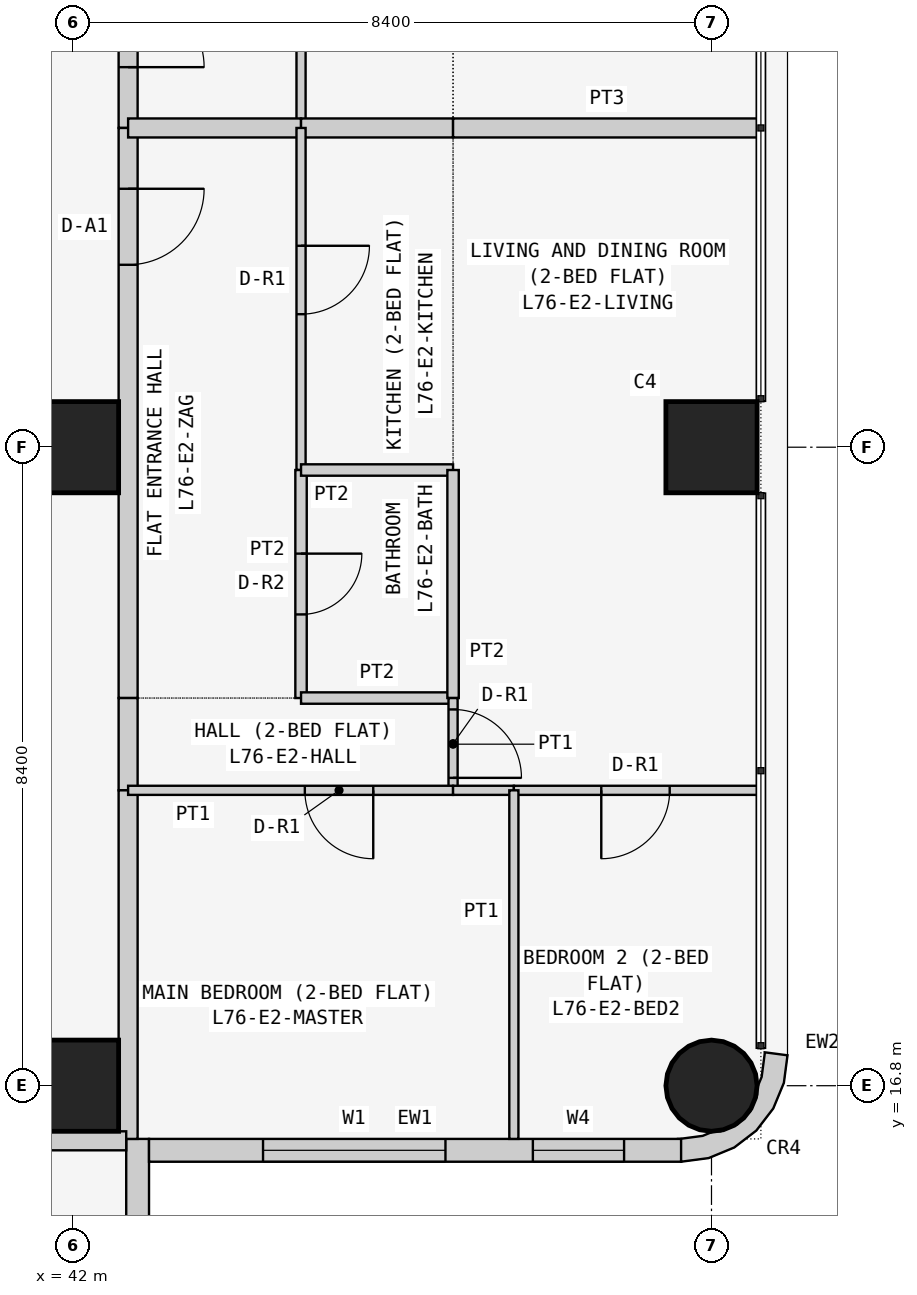
"""IFC4 building model, lengths in metres.
Left out: names, types, materials, properties, quantities, classifications, styles, units other than length and angle.
Written with IfcOpenShell. Run it as: python <this file> out.ifc"""

import sys

from ifc_helpers import new_model, si_unit, direction, frame, frame_2d, origin, origin_2d, place, context, subcontext, project, spatial, polyline, rectangle, circle, outline, extrude, element, fill, save


model = new_model("IFC4")
c1 = context("Model", 3, precision=1e-05, world=origin(), true_north=direction((0.0, 1.0)))
c2 = subcontext(c1, "Body", "Model", "MODEL_VIEW")
j1 = project(units=[si_unit("LENGTHUNIT", "METRE"), si_unit("PLANEANGLEUNIT", "RADIAN")], contexts=[c1])
p1 = place(None, origin())
s1 = spatial("IfcSite", under=j1, at=p1, CompositionType="ELEMENT")
p2 = place(p1, origin())
s2 = spatial("IfcBuilding", under=s1, at=p2, CompositionType="ELEMENT")
p3 = place(p2, frame((0.0, 0.0, 290.1)))
s3 = spatial("IfcBuildingStorey", under=s2, at=p3, CompositionType="ELEMENT", Elevation=290.1)
for number, where, z_axis, x_axis in (
    (1, (42.0, 16.8, 0.0), (0.0, 0.0, 1.0), (1.0, 0.0, 0.0)),
    (2, (42.0, 25.2, 0.0), (0.0, 0.0, 1.0), (1.0, 0.0, 0.0)),
):
    element("IfcColumn", number, at=place(p3, frame(where, z_axis=z_axis, x_axis=x_axis)), inside=s3, PredefinedType="COLUMN", context=c2, shape_type="SweptSolid", body=[
        extrude(rectangle(XDim=1.2, YDim=1.2, at=origin_2d()), origin(), (0.0, 0.0, 1.0), 3.6),
    ])
p4 = place(p3, frame((50.4, 16.8, 0.0), z_axis=(0.0, 0.0, 1.0), x_axis=(1.0, 0.0, 0.0)))
e3 = element("IfcColumn", 3, at=p4, inside=s3, PredefinedType="COLUMN", context=c2, shape_type="SweptSolid", body=[
    extrude(circle(Radius=0.6, at=origin_2d()), origin(), (0.0, 0.0, 1.0), 3.6),
])
p5 = place(p3, frame((50.4, 25.2, 0.0), z_axis=(0.0, 0.0, 1.0), x_axis=(1.0, 0.0, 0.0)))
e4 = element("IfcColumn", 4, at=p5, inside=s3, PredefinedType="COLUMN", context=c2, shape_type="SweptSolid", body=[
    extrude(rectangle(XDim=1.2, YDim=1.2, at=origin_2d()), origin(), (0.0, 0.0, 1.0), 3.6),
])
p6 = place(p3, frame((42.85, 8.8, 0.0), z_axis=(0.0, 0.0, 1.0), x_axis=(0.0, 1.0, 0.0)))
e5 = element("IfcWall", 5, at=p6, inside=s3, PredefinedType="SOLIDWALL", context=c2, shape_type="SweptSolid", body=[
    extrude(rectangle(XDim=7.3, YDim=0.3, at=frame_2d((3.65, 0.0))), origin(), (0.0, 0.0, 1.0), 3.45),
])
p7 = place(p6, frame((3.1, 0.0, 0.9)))
e6 = element("IfcOpeningElement", 6, at=p7, cuts=e5, PredefinedType="OPENING", context=c2, shape_type="SweptSolid", body=[
    extrude(rectangle(XDim=2.4, YDim=1.5, at=frame_2d((1.2, 0.75))), frame((0.0, 0.16, 0.0), z_axis=(0.0, -1.0, 0.0), x_axis=(1.0, 0.0, 0.0)), (0.0, 0.0, 1.0), 0.32),
])
p8 = place(p6, frame((0.75, 0.0, 0.9)))
e7 = element("IfcOpeningElement", 7, at=p8, cuts=e5, PredefinedType="OPENING", context=c2, shape_type="SweptSolid", body=[
    extrude(rectangle(XDim=1.2, YDim=1.5, at=frame_2d((0.6, 0.75))), frame((0.0, 0.16, 0.0), z_axis=(0.0, -1.0, 0.0), x_axis=(1.0, 0.0, 0.0)), (0.0, 0.0, 1.0), 0.32),
])
p9 = place(p3, frame((43.0, 15.95, 0.0), z_axis=(0.0, 0.0, 1.0), x_axis=(1.0, 0.0, 0.0)))
e8 = element("IfcWall", 8, at=p9, inside=s3, PredefinedType="SOLIDWALL", context=c2, shape_type="SweptSolid", body=[
    extrude(rectangle(XDim=7.0, YDim=0.3, at=frame_2d((3.5, 0.0))), origin(), (0.0, 0.0, 1.0), 3.45),
])
p10 = place(p9, frame((1.5, 0.0, 0.9)))
e9 = element("IfcOpeningElement", 9, at=p10, cuts=e8, PredefinedType="OPENING", context=c2, shape_type="SweptSolid", body=[
    extrude(rectangle(XDim=2.4, YDim=1.5, at=frame_2d((1.2, 0.75))), frame((0.0, 0.16, 0.0), z_axis=(0.0, -1.0, 0.0), x_axis=(1.0, 0.0, 0.0)), (0.0, 0.0, 1.0), 0.32),
])
p11 = place(p9, frame((5.05, 0.0, 0.9)))
e10 = element("IfcOpeningElement", 10, at=p11, cuts=e8, PredefinedType="OPENING", context=c2, shape_type="SweptSolid", body=[
    extrude(rectangle(XDim=1.2, YDim=1.5, at=frame_2d((0.6, 0.75))), frame((0.0, 0.16, 0.0), z_axis=(0.0, -1.0, 0.0), x_axis=(1.0, 0.0, 0.0)), (0.0, 0.0, 1.0), 0.32),
])
p12 = place(p3, frame((50.038, 16.224, 0.0), z_axis=(0.0, 0.0, 1.0), x_axis=(0.707106781187, -0.707106781187, 0.0)))
e11 = element("IfcWall", 11, at=p12, inside=s3, PredefinedType="SOLIDWALL", context=c2, shape_type="SweptSolid", body=[
    extrude(outline(polyline([(0.047, 1.455), (0.233, 1.212), (0.292, 1.069), (0.358, 1.003), (0.449, 0.782), (0.449, 0.543), (0.358, 0.322), (0.292, 0.257), (0.233, 0.114), (0.047, -0.129), (0.033, -0.143), (0.273, -0.327), (0.495, -0.037), (0.635, 0.301), (0.683, 0.663), (0.635, 1.025), (0.495, 1.363), (0.273, 1.653), (0.033, 1.469), (0.047, 1.455)])), origin(), (0.0, 0.0, 1.0), 3.45),
])
p13 = place(p3, frame((42.725, 36.9, 0.0), z_axis=(0.0, 0.0, 1.0), x_axis=(0.0, -1.0, 0.0)))
e12 = element("IfcWall", 12, at=p13, inside=s3, PredefinedType="PARTITIONING", context=c2, shape_type="SweptSolid", body=[
    extrude(rectangle(XDim=7.5, YDim=0.25, at=frame_2d((3.75, 0.0))), origin(), (0.0, 0.0, 1.0), 3.45),
])
p14 = place(p13, frame((5.7, 0.0, 0.0)))
e13 = element("IfcOpeningElement", 13, at=p14, cuts=e12, PredefinedType="OPENING", context=c2, shape_type="SweptSolid", body=[
    extrude(rectangle(XDim=1.0, YDim=2.1, at=frame_2d((0.5, 1.05))), frame((0.0, 0.135, 0.0), z_axis=(0.0, -1.0, 0.0), x_axis=(1.0, 0.0, 0.0)), (0.0, 0.0, 1.0), 0.27),
])
p15 = place(p3, frame((42.725, 29.4, 0.0), z_axis=(0.0, 0.0, 1.0), x_axis=(0.0, -1.0, 0.0)))
e14 = element("IfcWall", 14, at=p15, inside=s3, PredefinedType="PARTITIONING", context=c2, shape_type="SweptSolid", body=[
    extrude(rectangle(XDim=7.5, YDim=0.25, at=frame_2d((3.75, 0.0))), origin(), (0.0, 0.0, 1.0), 3.45),
])
p16 = place(p15, frame((0.8, 0.0, 0.0)))
e15 = element("IfcOpeningElement", 15, at=p16, cuts=e14, PredefinedType="OPENING", context=c2, shape_type="SweptSolid", body=[
    extrude(rectangle(XDim=1.0, YDim=2.1, at=frame_2d((0.5, 1.05))), frame((0.0, 0.135, 0.0), z_axis=(0.0, -1.0, 0.0), x_axis=(1.0, 0.0, 0.0)), (0.0, 0.0, 1.0), 0.27),
])
p17 = place(p3, frame((42.725, 21.9, 0.0), z_axis=(0.0, 0.0, 1.0), x_axis=(0.0, -1.0, 0.0)))
e16 = element("IfcWall", 16, at=p17, inside=s3, PredefinedType="PARTITIONING", context=c2, shape_type="SweptSolid", body=[
    extrude(rectangle(XDim=1.214, YDim=0.25, at=frame_2d((0.607, 0.0))), origin(), (0.0, 0.0, 1.0), 3.45),
])
p18 = place(p3, frame((42.725, 20.686, 0.0), z_axis=(0.0, 0.0, 1.0), x_axis=(0.0, -1.0, 0.0)))
e17 = element("IfcWall", 17, at=p18, inside=s3, PredefinedType="PARTITIONING", context=c2, shape_type="SweptSolid", body=[
    extrude(rectangle(XDim=4.586, YDim=0.25, at=frame_2d((2.293, 0.0))), origin(), (0.0, 0.0, 1.0), 3.45),
])
p19 = place(p3, frame((42.7, 16.075, 0.0), z_axis=(0.0, 0.0, 1.0), x_axis=(-1.0, 0.0, 0.0)))
e18 = element("IfcWall", 18, at=p19, inside=s3, PredefinedType="PARTITIONING", context=c2, shape_type="SweptSolid", body=[
    extrude(rectangle(XDim=6.871, YDim=0.25, at=frame_2d((3.436, 0.0))), origin(), (0.0, 0.0, 1.0), 3.45),
])
p20 = place(p3, frame((45.0, 29.4, 0.0), z_axis=(0.0, 0.0, 1.0), x_axis=(0.0, 1.0, 0.0)))
e19 = element("IfcWall", 19, at=p20, inside=s3, PredefinedType="PARTITIONING", context=c2, shape_type="SweptSolid", body=[
    extrude(rectangle(XDim=4.5, YDim=0.12, at=frame_2d((2.25, 0.0))), origin(), (0.0, 0.0, 1.0), 3.45),
])
p21 = place(p20, frame((1.55, 0.0, 0.0)))
e20 = element("IfcOpeningElement", 20, at=p21, cuts=e19, PredefinedType="OPENING", context=c2, shape_type="SweptSolid", body=[
    extrude(rectangle(XDim=0.9, YDim=2.1, at=frame_2d((0.45, 1.05))), frame((0.0, 0.07, 0.0), z_axis=(0.0, -1.0, 0.0), x_axis=(1.0, 0.0, 0.0)), (0.0, 0.0, 1.0), 0.14),
])
p22 = place(p3, frame((42.725, 29.4, 0.0), z_axis=(0.0, 0.0, 1.0), x_axis=(1.0, 0.0, 0.0)))
e21 = element("IfcWall", 21, at=p22, inside=s3, PredefinedType="PARTITIONING", context=c2, shape_type="SweptSolid", body=[
    extrude(rectangle(XDim=2.275, YDim=0.25, at=frame_2d((1.137, 0.0))), origin(), (0.0, 0.0, 1.0), 3.45),
])
p23 = place(p3, frame((45.0, 29.4, 0.0), z_axis=(0.0, 0.0, 1.0), x_axis=(1.0, 0.0, 0.0)))
e22 = element("IfcWall", 22, at=p23, inside=s3, PredefinedType="PARTITIONING", context=c2, shape_type="SweptSolid", body=[
    extrude(rectangle(XDim=2.0, YDim=0.25, at=frame_2d((1.0, 0.0))), origin(), (0.0, 0.0, 1.0), 3.45),
])
p24 = place(p3, frame((47.0, 29.4, 0.0), z_axis=(0.0, 0.0, 1.0), x_axis=(1.0, 0.0, 0.0)))
e23 = element("IfcWall", 23, at=p24, inside=s3, PredefinedType="PARTITIONING", context=c2, shape_type="SweptSolid", body=[
    extrude(rectangle(XDim=4.05, YDim=0.25, at=frame_2d((2.025, 0.0))), origin(), (0.0, 0.0, 1.0), 3.45),
])
p25 = place(p3, frame((45.0, 29.4, 0.0), z_axis=(0.0, 0.0, 1.0), x_axis=(0.0, -1.0, 0.0)))
e24 = element("IfcWall", 24, at=p25, inside=s3, PredefinedType="PARTITIONING", context=c2, shape_type="SweptSolid", body=[
    extrude(rectangle(XDim=4.5, YDim=0.12, at=frame_2d((2.25, 0.0))), origin(), (0.0, 0.0, 1.0), 3.45),
])
p26 = place(p25, frame((1.55, 0.0, 0.0)))
e25 = element("IfcOpeningElement", 25, at=p26, cuts=e24, PredefinedType="OPENING", context=c2, shape_type="SweptSolid", body=[
    extrude(rectangle(XDim=0.9, YDim=2.1, at=frame_2d((0.45, 1.05))), frame((0.0, 0.07, 0.0), z_axis=(0.0, -1.0, 0.0), x_axis=(1.0, 0.0, 0.0)), (0.0, 0.0, 1.0), 0.14),
])
p27 = place(p3, frame((45.0, 24.9, 0.0), z_axis=(0.0, 0.0, 1.0), x_axis=(0.0, -1.0, 0.0)))
e26 = element("IfcWall", 26, at=p27, inside=s3, PredefinedType="PARTITIONING", context=c2, shape_type="SweptSolid", body=[
    extrude(rectangle(XDim=3.0, YDim=0.15, at=frame_2d((1.5, 0.0))), origin(), (0.0, 0.0, 1.0), 3.45),
])
p28 = place(p27, frame((1.1, 0.0, 0.0)))
e27 = element("IfcOpeningElement", 27, at=p28, cuts=e26, PredefinedType="OPENING", context=c2, shape_type="SweptSolid", body=[
    extrude(rectangle(XDim=0.8, YDim=2.1, at=frame_2d((0.4, 1.05))), frame((0.0, 0.085, 0.0), z_axis=(0.0, -1.0, 0.0), x_axis=(1.0, 0.0, 0.0)), (0.0, 0.0, 1.0), 0.17),
])
for number, where, z_axis, x_axis in (
    (28, (47.0, 24.9, 0.0), (0.0, 0.0, 1.0), (-1.0, 0.0, 0.0)),
    (29, (47.0, 21.9, 0.0), (0.0, 0.0, 1.0), (-1.0, 0.0, 0.0)),
):
    element("IfcWall", number, at=place(p3, frame(where, z_axis=z_axis, x_axis=x_axis)), inside=s3, PredefinedType="PARTITIONING", context=c2, shape_type="SweptSolid", body=[
        extrude(rectangle(XDim=2.0, YDim=0.15, at=frame_2d((1.0, 0.0))), origin(), (0.0, 0.0, 1.0), 3.45),
    ])
p29 = place(p3, frame((47.0, 24.9, 0.0), z_axis=(0.0, 0.0, 1.0), x_axis=(0.0, -1.0, 0.0)))
e30 = element("IfcWall", 30, at=p29, inside=s3, PredefinedType="PARTITIONING", context=c2, shape_type="SweptSolid", body=[
    extrude(rectangle(XDim=3.0, YDim=0.15, at=frame_2d((1.5, 0.0))), origin(), (0.0, 0.0, 1.0), 3.45),
])
p30 = place(p3, frame((47.0, 21.9, 0.0), z_axis=(0.0, 0.0, 1.0), x_axis=(0.0, -1.0, 0.0)))
e31 = element("IfcWall", 31, at=p30, inside=s3, PredefinedType="PARTITIONING", context=c2, shape_type="SweptSolid", body=[
    extrude(rectangle(XDim=1.214, YDim=0.12, at=frame_2d((0.607, 0.0))), origin(), (0.0, 0.0, 1.0), 3.45),
])
p31 = place(p30, frame((0.15, 0.0, 0.0)))
e32 = element("IfcOpeningElement", 32, at=p31, cuts=e31, PredefinedType="OPENING", context=c2, shape_type="SweptSolid", body=[
    extrude(rectangle(XDim=0.9, YDim=2.1, at=frame_2d((0.45, 1.05))), frame((0.0, 0.07, 0.0), z_axis=(0.0, -1.0, 0.0), x_axis=(1.0, 0.0, 0.0)), (0.0, 0.0, 1.0), 0.14),
])
p32 = place(p3, frame((47.0, 20.686, 0.0), z_axis=(0.0, 0.0, 1.0), x_axis=(-1.0, 0.0, 0.0)))
e33 = element("IfcWall", 33, at=p32, inside=s3, PredefinedType="PARTITIONING", context=c2, shape_type="SweptSolid", body=[
    extrude(rectangle(XDim=4.275, YDim=0.12, at=frame_2d((2.137, 0.0))), origin(), (0.0, 0.0, 1.0), 3.45),
])
p33 = place(p32, frame((1.05, 0.0, 0.0)))
e34 = element("IfcOpeningElement", 34, at=p33, cuts=e33, PredefinedType="OPENING", context=c2, shape_type="SweptSolid", body=[
    extrude(rectangle(XDim=0.9, YDim=2.1, at=frame_2d((0.45, 1.05))), frame((0.0, 0.07, 0.0), z_axis=(0.0, -1.0, 0.0), x_axis=(1.0, 0.0, 0.0)), (0.0, 0.0, 1.0), 0.14),
])
p34 = place(p3, frame((47.8, 20.686, 0.0), z_axis=(0.0, 0.0, 1.0), x_axis=(-1.0, 0.0, 0.0)))
e35 = element("IfcWall", 35, at=p34, inside=s3, PredefinedType="PARTITIONING", context=c2, shape_type="SweptSolid", body=[
    extrude(rectangle(XDim=0.8, YDim=0.12, at=frame_2d((0.4, 0.0))), origin(), (0.0, 0.0, 1.0), 3.45),
])
p35 = place(p3, frame((51.05, 20.686, 0.0), z_axis=(0.0, 0.0, 1.0), x_axis=(-1.0, 0.0, 0.0)))
e36 = element("IfcWall", 36, at=p35, inside=s3, PredefinedType="PARTITIONING", context=c2, shape_type="SweptSolid", body=[
    extrude(rectangle(XDim=3.25, YDim=0.12, at=frame_2d((1.625, 0.0))), origin(), (0.0, 0.0, 1.0), 3.45),
])
p36 = place(p35, frame((1.2, 0.0, 0.0)))
e37 = element("IfcOpeningElement", 37, at=p36, cuts=e36, PredefinedType="OPENING", context=c2, shape_type="SweptSolid", body=[
    extrude(rectangle(XDim=0.9, YDim=2.1, at=frame_2d((0.45, 1.05))), frame((0.0, 0.07, 0.0), z_axis=(0.0, -1.0, 0.0), x_axis=(1.0, 0.0, 0.0)), (0.0, 0.0, 1.0), 0.14),
])
p37 = place(p3, frame((47.8, 20.686, 0.0), z_axis=(0.0, 0.0, 1.0), x_axis=(0.0, -1.0, 0.0)))
e38 = element("IfcWall", 38, at=p37, inside=s3, PredefinedType="PARTITIONING", context=c2, shape_type="SweptSolid", body=[
    extrude(rectangle(XDim=4.586, YDim=0.12, at=frame_2d((2.293, 0.0))), origin(), (0.0, 0.0, 1.0), 3.45),
])
p38 = place(p10, origin())
e39 = element("IfcWindow", 39, at=p38, inside=s3, PartitioningType="SINGLE_PANEL", PredefinedType="WINDOW", context=c2, shape_type="SweptSolid", body=[
    extrude(rectangle(XDim=2.4, YDim=1.5, at=frame_2d((1.2, 0.75))), frame((0.0, 0.03, 0.0), z_axis=(0.0, -1.0, 0.0), x_axis=(1.0, 0.0, 0.0)), (0.0, 0.0, 1.0), 0.06),
])
fill(e9, e39)
p39 = place(p11, origin())
e40 = element("IfcWindow", 40, at=p39, inside=s3, PartitioningType="SINGLE_PANEL", PredefinedType="WINDOW", context=c2, shape_type="SweptSolid", body=[
    extrude(rectangle(XDim=1.2, YDim=1.5, at=frame_2d((0.6, 0.75))), frame((0.0, 0.03, 0.0), z_axis=(0.0, -1.0, 0.0), x_axis=(1.0, 0.0, 0.0)), (0.0, 0.0, 1.0), 0.06),
])
fill(e10, e40)
p40 = place(p14, origin())
e41 = element("IfcDoor", 41, at=p40, inside=s3, OperationType="SINGLE_SWING_RIGHT", PredefinedType="DOOR", context=c2, shape_type="SweptSolid", body=[
    extrude(rectangle(XDim=1.0, YDim=2.1, at=frame_2d((0.5, 1.05))), frame((0.0, 0.025, 0.0), z_axis=(0.0, -1.0, 0.0), x_axis=(1.0, 0.0, 0.0)), (0.0, 0.0, 1.0), 0.05),
])
fill(e13, e41)
p41 = place(p16, origin())
e42 = element("IfcDoor", 42, at=p41, inside=s3, OperationType="SINGLE_SWING_LEFT", PredefinedType="DOOR", context=c2, shape_type="SweptSolid", body=[
    extrude(rectangle(XDim=1.0, YDim=2.1, at=frame_2d((0.5, 1.05))), frame((0.0, 0.025, 0.0), z_axis=(0.0, -1.0, 0.0), x_axis=(1.0, 0.0, 0.0)), (0.0, 0.0, 1.0), 0.05),
])
fill(e15, e42)
p42 = place(p26, origin())
e43 = element("IfcDoor", 43, at=p42, inside=s3, OperationType="SINGLE_SWING_LEFT", PredefinedType="DOOR", context=c2, shape_type="SweptSolid", body=[
    extrude(rectangle(XDim=0.9, YDim=2.1, at=frame_2d((0.45, 1.05))), frame((0.0, 0.025, 0.0), z_axis=(0.0, -1.0, 0.0), x_axis=(1.0, 0.0, 0.0)), (0.0, 0.0, 1.0), 0.05),
])
fill(e25, e43)
p43 = place(p28, origin())
e44 = element("IfcDoor", 44, at=p43, inside=s3, OperationType="SINGLE_SWING_LEFT", PredefinedType="DOOR", context=c2, shape_type="SweptSolid", body=[
    extrude(rectangle(XDim=0.8, YDim=2.1, at=frame_2d((0.4, 1.05))), frame((0.0, 0.025, 0.0), z_axis=(0.0, -1.0, 0.0), x_axis=(1.0, 0.0, 0.0)), (0.0, 0.0, 1.0), 0.05),
])
fill(e27, e44)
p44 = place(p31, origin())
e45 = element("IfcDoor", 45, at=p44, inside=s3, OperationType="SINGLE_SWING_RIGHT", PredefinedType="DOOR", context=c2, shape_type="SweptSolid", body=[
    extrude(rectangle(XDim=0.9, YDim=2.1, at=frame_2d((0.45, 1.05))), frame((0.0, 0.025, 0.0), z_axis=(0.0, -1.0, 0.0), x_axis=(1.0, 0.0, 0.0)), (0.0, 0.0, 1.0), 0.05),
])
fill(e32, e45)
p45 = place(p33, origin())
e46 = element("IfcDoor", 46, at=p45, inside=s3, OperationType="SINGLE_SWING_LEFT", PredefinedType="DOOR", context=c2, shape_type="SweptSolid", body=[
    extrude(rectangle(XDim=0.9, YDim=2.1, at=frame_2d((0.45, 1.05))), frame((0.0, 0.025, 0.0), z_axis=(0.0, -1.0, 0.0), x_axis=(1.0, 0.0, 0.0)), (0.0, 0.0, 1.0), 0.05),
])
fill(e34, e46)
p46 = place(p36, origin())
e47 = element("IfcDoor", 47, at=p46, inside=s3, OperationType="SINGLE_SWING_RIGHT", PredefinedType="DOOR", context=c2, shape_type="SweptSolid", body=[
    extrude(rectangle(XDim=0.9, YDim=2.1, at=frame_2d((0.45, 1.05))), frame((0.0, 0.025, 0.0), z_axis=(0.0, -1.0, 0.0), x_axis=(1.0, 0.0, 0.0)), (0.0, 0.0, 1.0), 0.05),
])
fill(e37, e47)
save(model, sys.argv[1])
